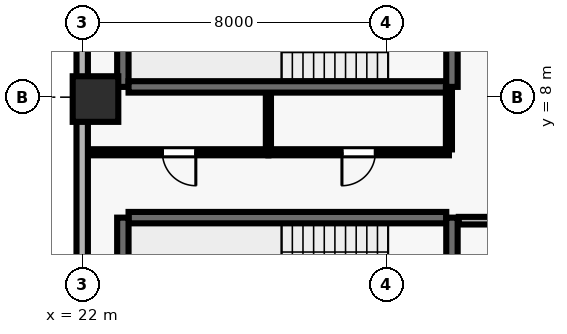
"""IFC4 building model, lengths in metres.
Left out: names, types, materials, properties, quantities, classifications, styles, units other than length and angle.
Written with IfcOpenShell. Run it as: python <this file> out.ifc"""

import sys

from ifc_helpers import new_model, si_unit, direction, frame, frame_2d, origin, origin_2d, place, context, subcontext, project, spatial, rectangle, extrude, element, fill, save


model = new_model("IFC4")
c1 = context("Model", 3, precision=1e-05, world=origin(), true_north=direction((0.0, 1.0)))
c2 = subcontext(c1, "Body", "Model", "MODEL_VIEW")
j1 = project(units=[si_unit("LENGTHUNIT", "METRE"), si_unit("PLANEANGLEUNIT", "RADIAN")], contexts=[c1])
p1 = place(None, origin())
s1 = spatial("IfcSite", under=j1, at=p1, CompositionType="ELEMENT")
p2 = place(p1, origin())
s2 = spatial("IfcBuilding", under=s1, at=p2, CompositionType="ELEMENT")
p3 = place(p2, frame((0.0, 0.0, 111.2)))
s3 = spatial("IfcBuildingStorey", under=s2, at=p3, CompositionType="ELEMENT", Elevation=111.2)
p4 = place(p3, frame((22.35, 7.95, 0.0), z_axis=(0.0, 0.0, 1.0), x_axis=(1.0, 0.0, 0.0)))
e1 = element("IfcColumn", 1, at=p4, inside=s3, PredefinedType="COLUMN", context=c2, shape_type="SweptSolid", body=[
    extrude(rectangle(XDim=1.2, YDim=1.2, at=origin_2d()), origin(), (0.0, 0.0, 1.0), 3.9),
])
p5 = place(p3, frame((22.0, 46.1, 0.0), z_axis=(0.0, 0.0, 1.0), x_axis=(0.0, -1.0, 0.0)))
e2 = element("IfcWall", 2, at=p5, inside=s3, PredefinedType="SOLIDWALL", context=c2, shape_type="SweptSolid", body=[
    extrude(rectangle(XDim=43.6, YDim=0.3, at=frame_2d((21.8, 0.0))), origin(), (0.0, 0.0, 1.0), 3.69),
])
p6 = place(p5, frame((7.1, 0.0, 0.0)))
e3 = element("IfcOpeningElement", 3, at=p6, cuts=e2, PredefinedType="OPENING", context=c2, shape_type="SweptSolid", body=[
    extrude(rectangle(XDim=1.0, YDim=2.2, at=frame_2d((0.5, 1.1))), frame((0.0, 0.16, 0.0), z_axis=(0.0, -1.0, 0.0), x_axis=(1.0, 0.0, 0.0)), (0.0, 0.0, 1.0), 0.32),
])
p7 = place(p5, frame((1.825, 0.0, 0.9)))
e4 = element("IfcOpeningElement", 4, at=p7, cuts=e2, PredefinedType="OPENING", context=c2, shape_type="SweptSolid", body=[
    extrude(rectangle(XDim=1.8, YDim=1.6, at=frame_2d((0.9, 0.8))), frame((0.0, 0.16, 0.0), z_axis=(0.0, -1.0, 0.0), x_axis=(1.0, 0.0, 0.0)), (0.0, 0.0, 1.0), 0.32),
])
p8 = place(p5, frame((13.175, 0.0, 0.9)))
e5 = element("IfcOpeningElement", 5, at=p8, cuts=e2, PredefinedType="OPENING", context=c2, shape_type="SweptSolid", body=[
    extrude(rectangle(XDim=1.8, YDim=1.6, at=frame_2d((0.9, 0.8))), frame((0.0, 0.16, 0.0), z_axis=(0.0, -1.0, 0.0), x_axis=(1.0, 0.0, 0.0)), (0.0, 0.0, 1.0), 0.32),
])
p9 = place(p5, frame((17.725, 0.0, 0.9)))
e6 = element("IfcOpeningElement", 6, at=p9, cuts=e2, PredefinedType="OPENING", context=c2, shape_type="SweptSolid", body=[
    extrude(rectangle(XDim=1.8, YDim=1.6, at=frame_2d((0.9, 0.8))), frame((0.0, 0.16, 0.0), z_axis=(0.0, -1.0, 0.0), x_axis=(1.0, 0.0, 0.0)), (0.0, 0.0, 1.0), 0.32),
])
p10 = place(p5, frame((23.625, 0.0, 0.9)))
e7 = element("IfcOpeningElement", 7, at=p10, cuts=e2, PredefinedType="OPENING", context=c2, shape_type="SweptSolid", body=[
    extrude(rectangle(XDim=1.8, YDim=1.6, at=frame_2d((0.9, 0.8))), frame((0.0, 0.16, 0.0), z_axis=(0.0, -1.0, 0.0), x_axis=(1.0, 0.0, 0.0)), (0.0, 0.0, 1.0), 0.32),
])
p11 = place(p5, frame((28.625, 0.0, 0.9)))
e8 = element("IfcOpeningElement", 8, at=p11, cuts=e2, PredefinedType="OPENING", context=c2, shape_type="SweptSolid", body=[
    extrude(rectangle(XDim=1.8, YDim=1.6, at=frame_2d((0.9, 0.8))), frame((0.0, 0.16, 0.0), z_axis=(0.0, -1.0, 0.0), x_axis=(1.0, 0.0, 0.0)), (0.0, 0.0, 1.0), 0.32),
])
p12 = place(p5, frame((34.525, 0.0, 0.9)))
e9 = element("IfcOpeningElement", 9, at=p12, cuts=e2, PredefinedType="OPENING", context=c2, shape_type="SweptSolid", body=[
    extrude(rectangle(XDim=1.8, YDim=1.6, at=frame_2d((0.9, 0.8))), frame((0.0, 0.16, 0.0), z_axis=(0.0, -1.0, 0.0), x_axis=(1.0, 0.0, 0.0)), (0.0, 0.0, 1.0), 0.32),
])
p13 = place(p3, frame((31.58, 4.83, 0.0), z_axis=(0.0, 0.0, 1.0), x_axis=(-1.0, 0.0, 0.0)))
e10 = element("IfcWall", 10, at=p13, inside=s3, PredefinedType="SHEAR", context=c2, shape_type="SweptSolid", body=[
    extrude(rectangle(XDim=8.36, YDim=0.3, at=frame_2d((4.18, 0.0))), origin(), (0.0, 0.0, 1.0), 3.69),
])
p14 = place(p3, frame((23.07, 4.83, 0.0), z_axis=(0.0, 0.0, 1.0), x_axis=(0.0, -1.0, 0.0)))
e11 = element("IfcWall", 11, at=p14, inside=s3, PredefinedType="SHEAR", context=c2, shape_type="SweptSolid", body=[
    extrude(rectangle(XDim=3.51, YDim=0.3, at=frame_2d((1.755, 0.0))), origin(), (0.0, 0.0, 1.0), 3.69),
])
p15 = place(p3, frame((31.73, 0.96, 0.0), z_axis=(0.0, 0.0, 1.0), x_axis=(0.0, 1.0, 0.0)))
e12 = element("IfcWall", 12, at=p15, inside=s3, PredefinedType="SHEAR", context=c2, shape_type="SweptSolid", body=[
    extrude(rectangle(XDim=3.87, YDim=0.3, at=frame_2d((1.935, 0.0))), origin(), (0.0, 0.0, 1.0), 3.69),
])
p16 = place(p15, frame((1.54, 0.0, 0.0)))
e13 = element("IfcOpeningElement", 13, at=p16, cuts=e12, PredefinedType="OPENING", context=c2, shape_type="SweptSolid", body=[
    extrude(rectangle(XDim=1.15, YDim=2.15, at=frame_2d((0.575, 1.075))), frame((0.0, 0.16, 0.0), z_axis=(0.0, -1.0, 0.0), x_axis=(1.0, 0.0, 0.0)), (0.0, 0.0, 1.0), 0.32),
])
p17 = place(p3, frame((23.07, 11.78, 0.0), z_axis=(0.0, 0.0, 1.0), x_axis=(0.0, -1.0, 0.0)))
e14 = element("IfcWall", 14, at=p17, inside=s3, PredefinedType="SHEAR", context=c2, shape_type="SweptSolid", body=[
    extrude(rectangle(XDim=3.51, YDim=0.3, at=frame_2d((1.755, 0.0))), origin(), (0.0, 0.0, 1.0), 3.69),
])
p18 = place(p3, frame((23.22, 8.27, 0.0), z_axis=(0.0, 0.0, 1.0), x_axis=(1.0, 0.0, 0.0)))
e15 = element("IfcWall", 15, at=p18, inside=s3, PredefinedType="SHEAR", context=c2, shape_type="SweptSolid", body=[
    extrude(rectangle(XDim=8.36, YDim=0.3, at=frame_2d((4.18, 0.0))), origin(), (0.0, 0.0, 1.0), 3.69),
])
p19 = place(p3, frame((31.73, 8.27, 0.0), z_axis=(0.0, 0.0, 1.0), x_axis=(0.0, 1.0, 0.0)))
e16 = element("IfcWall", 16, at=p19, inside=s3, PredefinedType="SHEAR", context=c2, shape_type="SweptSolid", body=[
    extrude(rectangle(XDim=3.51, YDim=0.3, at=frame_2d((1.755, 0.0))), origin(), (0.0, 0.0, 1.0), 3.69),
])
p20 = place(p19, frame((1.18, 0.0, 0.0)))
e17 = element("IfcOpeningElement", 17, at=p20, cuts=e16, PredefinedType="OPENING", context=c2, shape_type="SweptSolid", body=[
    extrude(rectangle(XDim=1.15, YDim=2.15, at=frame_2d((0.575, 1.075))), frame((0.0, 0.16, 0.0), z_axis=(0.0, -1.0, 0.0), x_axis=(1.0, 0.0, 0.0)), (0.0, 0.0, 1.0), 0.32),
])
p21 = place(p3, frame((26.9, 6.55, 0.0), z_axis=(0.0, 0.0, 1.0), x_axis=(-1.0, 0.0, 0.0)))
e18 = element("IfcWall", 18, at=p21, inside=s3, PredefinedType="PARTITIONING", context=c2, shape_type="SweptSolid", body=[
    extrude(rectangle(XDim=4.7, YDim=0.16, at=frame_2d((2.35, 0.0))), origin(), (0.0, 0.0, 1.0), 3.69),
])
p22 = place(p21, frame((1.91, 0.0, 0.0)))
e19 = element("IfcOpeningElement", 19, at=p22, cuts=e18, PredefinedType="OPENING", context=c2, shape_type="SweptSolid", body=[
    extrude(rectangle(XDim=0.88, YDim=2.1, at=frame_2d((0.44, 1.05))), frame((0.0, 0.09, 0.0), z_axis=(0.0, -1.0, 0.0), x_axis=(1.0, 0.0, 0.0)), (0.0, 0.0, 1.0), 0.18),
])
p23 = place(p3, frame((31.65, 6.55, 0.0), z_axis=(0.0, 0.0, 1.0), x_axis=(-1.0, 0.0, 0.0)))
e20 = element("IfcWall", 20, at=p23, inside=s3, PredefinedType="PARTITIONING", context=c2, shape_type="SweptSolid", body=[
    extrude(rectangle(XDim=4.75, YDim=0.16, at=frame_2d((2.375, 0.0))), origin(), (0.0, 0.0, 1.0), 3.69),
])
p24 = place(p23, frame((1.935, 0.0, 0.0)))
e21 = element("IfcOpeningElement", 21, at=p24, cuts=e20, PredefinedType="OPENING", context=c2, shape_type="SweptSolid", body=[
    extrude(rectangle(XDim=0.88, YDim=2.1, at=frame_2d((0.44, 1.05))), frame((0.0, 0.09, 0.0), z_axis=(0.0, -1.0, 0.0), x_axis=(1.0, 0.0, 0.0)), (0.0, 0.0, 1.0), 0.18),
])
p25 = place(p3, frame((35.02, 4.75, 0.0), z_axis=(0.0, 0.0, 1.0), x_axis=(-1.0, 0.0, 0.0)))
e22 = element("IfcWall", 22, at=p25, inside=s3, PredefinedType="SOLIDWALL", context=c2, shape_type="SweptSolid", body=[
    extrude(rectangle(XDim=3.11, YDim=0.2, at=frame_2d((1.555, 0.0))), origin(), (0.0, 0.0, 1.0), 3.69),
])
p26 = place(p25, frame((1.03, 0.0, 0.0)))
e23 = element("IfcOpeningElement", 23, at=p26, cuts=e22, PredefinedType="OPENING", context=c2, shape_type="SweptSolid", body=[
    extrude(rectangle(XDim=1.05, YDim=2.15, at=frame_2d((0.525, 1.075))), frame((0.0, 0.11, 0.0), z_axis=(0.0, -1.0, 0.0), x_axis=(1.0, 0.0, 0.0)), (0.0, 0.0, 1.0), 0.22),
])
p27 = place(p3, frame((26.9, 6.625, 0.0), z_axis=(0.0, 0.0, 1.0), x_axis=(0.0, 1.0, 0.0)))
e24 = element("IfcWall", 24, at=p27, inside=s3, PredefinedType="PARTITIONING", context=c2, shape_type="SweptSolid", body=[
    extrude(rectangle(XDim=1.465, YDim=0.135, at=frame_2d((0.732, 0.0))), origin(), (0.0, 0.0, 1.0), 3.69),
])
p28 = place(p3, frame((31.65, 8.24, 0.0), z_axis=(0.0, 0.0, 1.0), x_axis=(0.0, -1.0, 0.0)))
e25 = element("IfcWall", 25, at=p28, inside=s3, PredefinedType="PARTITIONING", context=c2, shape_type="SweptSolid", body=[
    extrude(rectangle(XDim=1.615, YDim=0.16, at=frame_2d((0.808, 0.0))), origin(), (0.0, 0.0, 1.0), 3.69),
])
p29 = place(p22, origin())
e26 = element("IfcDoor", 26, at=p29, inside=s3, OperationType="SINGLE_SWING_LEFT", PredefinedType="DOOR", context=c2, shape_type="SweptSolid", body=[
    extrude(rectangle(XDim=0.88, YDim=2.1, at=frame_2d((0.44, 1.05))), frame((0.0, 0.025, 0.0), z_axis=(0.0, -1.0, 0.0), x_axis=(1.0, 0.0, 0.0)), (0.0, 0.0, 1.0), 0.05),
])
fill(e19, e26)
p30 = place(p24, origin())
e27 = element("IfcDoor", 27, at=p30, inside=s3, OperationType="SINGLE_SWING_RIGHT", PredefinedType="DOOR", context=c2, shape_type="SweptSolid", body=[
    extrude(rectangle(XDim=0.88, YDim=2.1, at=frame_2d((0.44, 1.05))), frame((0.0, 0.025, 0.0), z_axis=(0.0, -1.0, 0.0), x_axis=(1.0, 0.0, 0.0)), (0.0, 0.0, 1.0), 0.05),
])
fill(e21, e27)
save(model, sys.argv[1])
